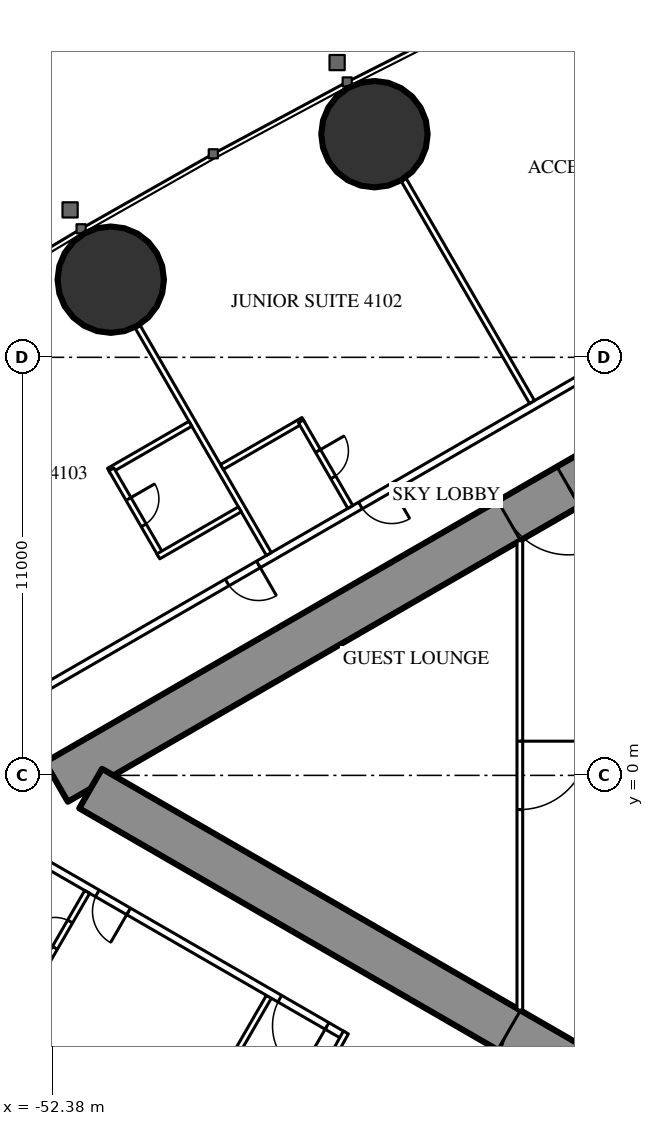
"""IFC4 building model, lengths in metres.
Left out: names, types, materials, properties, quantities, classifications, styles, units other than length and angle.
Written with IfcOpenShell. Run it as: python <this file> out.ifc"""

import sys

from ifc_helpers import new_model, si_unit, direction, frame, frame_2d, origin, origin_2d, place, context, subcontext, project, spatial, rectangle, circle, extrude, element, fill, save


model = new_model("IFC4")
c1 = context("Model", 3, precision=1e-05, world=origin(), true_north=direction((0.0, 1.0)))
c2 = subcontext(c1, "Body", "Model", "MODEL_VIEW")
j1 = project(units=[si_unit("LENGTHUNIT", "METRE"), si_unit("PLANEANGLEUNIT", "RADIAN")], contexts=[c1])
p1 = place(None, origin())
s1 = spatial("IfcSite", under=j1, at=p1, CompositionType="ELEMENT")
p2 = place(p1, origin())
s2 = spatial("IfcBuilding", under=s1, at=p2, CompositionType="ELEMENT")
p3 = place(p2, frame((0.0, 0.0, 156.3)))
s3 = spatial("IfcBuildingStorey", under=s2, at=p3, CompositionType="ELEMENT", Elevation=156.3)
for number, where, z_axis, x_axis in (
    (1, (-43.9, 16.871, 0.0), (0.0, 0.0, 1.0), (1.0, 0.0, 0.0)),
    (2, (-50.839, 13.043, 0.0), (0.0, 0.0, 1.0), (1.0, 0.0, 0.0)),
):
    element("IfcColumn", number, at=place(p3, frame(where, z_axis=z_axis, x_axis=x_axis)), inside=s3, PredefinedType="COLUMN", context=c2, shape_type="SweptSolid", body=[
        extrude(circle(Radius=1.4, at=origin_2d()), origin(), (0.0, 0.0, 1.0), 3.5),
    ])
p4 = place(p3, frame((-27.2, 14.3, 0.0), z_axis=(0.0, 0.0, 1.0), x_axis=(-0.866026593062, -0.499997940104, 0.0)))
e3 = element("IfcWall", 3, at=p4, inside=s3, PredefinedType="SHEAR", context=c2, shape_type="SweptSolid", body=[
    extrude(rectangle(XDim=28.946, YDim=1.2, at=frame_2d((14.473, 0.0))), origin(), (0.0, 0.0, 1.0), 3.5),
])
p5 = place(p4, frame((4.6, 0.0, 0.0)))
e4 = element("IfcOpeningElement", 4, at=p5, cuts=e3, PredefinedType="OPENING", context=c2, shape_type="SweptSolid", body=[
    extrude(rectangle(XDim=1.0, YDim=2.2, at=frame_2d((0.5, 1.1))), frame((0.0, 0.61, 0.0), z_axis=(0.0, -1.0, 0.0), x_axis=(1.0, 0.0, 0.0)), (0.0, 0.0, 1.0), 1.22),
])
p6 = place(p4, frame((13.395, 0.0, 0.0)))
e5 = element("IfcOpeningElement", 5, at=p6, cuts=e3, PredefinedType="OPENING", context=c2, shape_type="SweptSolid", body=[
    extrude(rectangle(XDim=1.8, YDim=2.2, at=frame_2d((0.9, 1.1))), frame((0.0, 0.61, 0.0), z_axis=(0.0, -1.0, 0.0), x_axis=(1.0, 0.0, 0.0)), (0.0, 0.0, 1.0), 1.22),
])
p7 = place(p3, frame((-27.2, -14.3, 0.0), z_axis=(0.0, 0.0, 1.0), x_axis=(-0.866024021859, 0.500002393557, 0.0)))
e6 = element("IfcWall", 6, at=p7, inside=s3, PredefinedType="SHEAR", context=c2, shape_type="SweptSolid", body=[
    extrude(rectangle(XDim=27.907, YDim=1.2, at=frame_2d((13.954, 0.0))), origin(), (0.0, 0.0, 1.0), 3.5),
])
p8 = place(p7, frame((4.6, 0.0, 0.0)))
e7 = element("IfcOpeningElement", 7, at=p8, cuts=e6, PredefinedType="OPENING", context=c2, shape_type="SweptSolid", body=[
    extrude(rectangle(XDim=1.0, YDim=2.2, at=frame_2d((0.5, 1.1))), frame((0.0, 0.61, 0.0), z_axis=(0.0, -1.0, 0.0), x_axis=(1.0, 0.0, 0.0)), (0.0, 0.0, 1.0), 1.22),
])
p9 = place(p7, frame((13.395, 0.0, 0.0)))
e8 = element("IfcOpeningElement", 8, at=p9, cuts=e6, PredefinedType="OPENING", context=c2, shape_type="SweptSolid", body=[
    extrude(rectangle(XDim=1.8, YDim=2.2, at=frame_2d((0.9, 1.1))), frame((0.0, 0.61, 0.0), z_axis=(0.0, -1.0, 0.0), x_axis=(1.0, 0.0, 0.0)), (0.0, 0.0, 1.0), 1.22),
])
p10 = place(p3, frame((-27.86, 16.575, 0.0), z_axis=(0.0, 0.0, 1.0), x_axis=(-0.866025533911, -0.499999774615, 0.0)))
e9 = element("IfcWall", 9, at=p10, inside=s3, PredefinedType="PARTITIONING", context=c2, shape_type="SweptSolid", body=[
    extrude(rectangle(XDim=33.149, YDim=0.2, at=frame_2d((16.575, 0.0))), origin(), (0.0, 0.0, 1.0), 3.25),
])
p11 = place(p10, frame((3.75, 0.0, 0.0)))
e10 = element("IfcOpeningElement", 10, at=p11, cuts=e9, PredefinedType="OPENING", context=c2, shape_type="SweptSolid", body=[
    extrude(rectangle(XDim=1.0, YDim=2.2, at=frame_2d((0.5, 1.1))), frame((0.0, 0.11, 0.0), z_axis=(0.0, -1.0, 0.0), x_axis=(1.0, 0.0, 0.0)), (0.0, 0.0, 1.0), 0.22),
])
p12 = place(p10, frame((17.997, 0.0, 0.0)))
e11 = element("IfcOpeningElement", 11, at=p12, cuts=e9, PredefinedType="OPENING", context=c2, shape_type="SweptSolid", body=[
    extrude(rectangle(XDim=0.95, YDim=2.2, at=frame_2d((0.475, 1.1))), frame((0.0, 0.11, 0.0), z_axis=(0.0, -1.0, 0.0), x_axis=(1.0, 0.0, 0.0)), (0.0, 0.0, 1.0), 0.22),
])
p13 = place(p10, frame((22.047, 0.0, 0.0)))
e12 = element("IfcOpeningElement", 12, at=p13, cuts=e9, PredefinedType="OPENING", context=c2, shape_type="SweptSolid", body=[
    extrude(rectangle(XDim=0.95, YDim=2.2, at=frame_2d((0.475, 1.1))), frame((0.0, 0.11, 0.0), z_axis=(0.0, -1.0, 0.0), x_axis=(1.0, 0.0, 0.0)), (0.0, 0.0, 1.0), 0.22),
])
p14 = place(p10, frame((30.042, 0.0, 0.0)))
e13 = element("IfcOpeningElement", 13, at=p14, cuts=e9, PredefinedType="OPENING", context=c2, shape_type="SweptSolid", body=[
    extrude(rectangle(XDim=0.95, YDim=2.2, at=frame_2d((0.475, 1.1))), frame((0.0, 0.11, 0.0), z_axis=(0.0, -1.0, 0.0), x_axis=(1.0, 0.0, 0.0)), (0.0, 0.0, 1.0), 0.22),
])
p15 = place(p3, frame((-39.754, 9.823, 0.0), z_axis=(0.0, 0.0, 1.0), x_axis=(-0.499997670926, 0.866026748472, 0.0)))
e14 = element("IfcWall", 14, at=p15, inside=s3, PredefinedType="PARTITIONING", context=c2, shape_type="SweptSolid", body=[
    extrude(rectangle(XDim=6.757, YDim=0.15, at=frame_2d((3.379, 0.0))), origin(), (0.0, 0.0, 1.0), 2.3),
])
for number, where, z_axis, x_axis in (
    (15, (-46.679, 5.825, 0.0), (0.0, 0.0, 1.0), (-0.5, 0.866, 0.0)),
    (16, (-46.679, -5.825, 0.0), (0.0, 0.0, 1.0), (-0.5, -0.866, 0.0)),
):
    element("IfcWall", number, at=place(p3, frame(where, z_axis=z_axis, x_axis=x_axis)), inside=s3, PredefinedType="PARTITIONING", context=c2, shape_type="SweptSolid", body=[
        extrude(rectangle(XDim=6.911, YDim=0.15, at=frame_2d((3.456, 0.0))), origin(), (0.0, 0.0, 1.0), 2.3),
    ])
p16 = place(p3, frame((-44.715, -6.844, 0.0), z_axis=(0.0, 0.0, 1.0), x_axis=(-0.866025261224, 0.500000246922, 0.0)))
e17 = element("IfcWall", 17, at=p16, inside=s3, PredefinedType="PARTITIONING", context=c2, shape_type="SweptSolid", body=[
    extrude(rectangle(XDim=13.567, YDim=0.2, at=frame_2d((6.783, 0.0))), origin(), (0.0, 0.0, 1.0), 3.25),
])
p17 = place(p16, frame((10.579, 0.0, 0.0)))
e18 = element("IfcOpeningElement", 18, at=p17, cuts=e17, PredefinedType="OPENING", context=c2, shape_type="SweptSolid", body=[
    extrude(rectangle(XDim=0.95, YDim=2.2, at=frame_2d((0.475, 1.1))), frame((0.0, 0.11, 0.0), z_axis=(0.0, -1.0, 0.0), x_axis=(1.0, 0.0, 0.0)), (0.0, 0.0, 1.0), 0.22),
])
p18 = place(p16, frame((6.529, 0.0, 0.0)))
e19 = element("IfcOpeningElement", 19, at=p18, cuts=e17, PredefinedType="OPENING", context=c2, shape_type="SweptSolid", body=[
    extrude(rectangle(XDim=0.95, YDim=2.2, at=frame_2d((0.475, 1.1))), frame((0.0, 0.11, 0.0), z_axis=(0.0, -1.0, 0.0), x_axis=(1.0, 0.0, 0.0)), (0.0, 0.0, 1.0), 0.22),
])
p19 = place(p16, frame((0.5, 0.0, 0.0)))
e20 = element("IfcOpeningElement", 20, at=p19, cuts=e17, PredefinedType="OPENING", context=c2, shape_type="SweptSolid", body=[
    extrude(rectangle(XDim=1.435, YDim=2.2, at=frame_2d((0.718, 1.1))), frame((0.0, 0.11, 0.0), z_axis=(0.0, -1.0, 0.0), x_axis=(1.0, 0.0, 0.0)), (0.0, 0.0, 1.0), 0.22),
])
p20 = place(p3, frame((-44.652, -6.764, 0.0), z_axis=(0.0, 0.0, 1.0), x_axis=(-0.485424724123, -0.874278466629, 0.0)))
e21 = element("IfcWall", 21, at=p20, inside=s3, PredefinedType="PARTITIONING", context=c2, shape_type="SweptSolid", body=[
    extrude(rectangle(XDim=1.805, YDim=0.15, at=frame_2d((0.903, 0.0))), origin(), (0.0, 0.0, 1.0), 3.25),
])
p21 = place(p3, frame((-45.771, 9.352, 0.0), z_axis=(0.0, 0.0, 1.0), x_axis=(-0.866006523861, -0.500032699561, 0.0)))
e22 = element("IfcWall", 22, at=p21, inside=s3, PredefinedType="PARTITIONING", context=c2, shape_type="SweptSolid", body=[
    extrude(rectangle(XDim=2.475, YDim=0.15, at=frame_2d((1.237, 0.0))), origin(), (0.0, 0.0, 1.0), 3.25),
])
p22 = place(p3, frame((-44.535, 7.063, 0.0), z_axis=(0.0, 0.0, 1.0), x_axis=(-0.500047596559, 0.865997922154, 0.0)))
e23 = element("IfcWall", 23, at=p22, inside=s3, PredefinedType="PARTITIONING", context=c2, shape_type="SweptSolid", body=[
    extrude(rectangle(XDim=2.6, YDim=0.15, at=frame_2d((1.3, 0.0))), origin(), (0.0, 0.0, 1.0), 3.25),
])
p23 = place(p22, frame((0.9, 0.0, 0.0)))
e24 = element("IfcOpeningElement", 24, at=p23, cuts=e23, PredefinedType="OPENING", context=c2, shape_type="SweptSolid", body=[
    extrude(rectangle(XDim=0.8, YDim=2.2, at=frame_2d((0.4, 1.1))), frame((0.0, 0.085, 0.0), z_axis=(0.0, -1.0, 0.0), x_axis=(1.0, 0.0, 0.0)), (0.0, 0.0, 1.0), 0.17),
])
p24 = place(p3, frame((-48.744, 9.252, 0.0), z_axis=(0.0, 0.0, 1.0), x_axis=(-0.866006523861, -0.500032699561, 0.0)))
e25 = element("IfcWall", 25, at=p24, inside=s3, PredefinedType="PARTITIONING", context=c2, shape_type="SweptSolid", body=[
    extrude(rectangle(XDim=2.475, YDim=0.15, at=frame_2d((1.237, 0.0))), origin(), (0.0, 0.0, 1.0), 3.25),
])
p25 = place(p3, frame((-49.522, 5.8, 0.0), z_axis=(0.0, 0.0, 1.0), x_axis=(-0.500006934395, 0.866021400173, 0.0)))
e26 = element("IfcWall", 26, at=p25, inside=s3, PredefinedType="PARTITIONING", context=c2, shape_type="SweptSolid", body=[
    extrude(rectangle(XDim=2.6, YDim=0.15, at=frame_2d((1.3, 0.0))), origin(), (0.0, 0.0, 1.0), 3.25),
])
p26 = place(p25, frame((0.9, 0.0, 0.0)))
e27 = element("IfcOpeningElement", 27, at=p26, cuts=e26, PredefinedType="OPENING", context=c2, shape_type="SweptSolid", body=[
    extrude(rectangle(XDim=0.8, YDim=2.2, at=frame_2d((0.4, 1.1))), frame((0.0, 0.085, 0.0), z_axis=(0.0, -1.0, 0.0), x_axis=(1.0, 0.0, 0.0)), (0.0, 0.0, 1.0), 0.17),
])
p27 = place(p3, frame((-47.444, 7.0, 0.0), z_axis=(0.0, 0.0, 1.0), x_axis=(-0.866006523861, -0.500032699561, 0.0)))
e28 = element("IfcWall", 28, at=p27, inside=s3, PredefinedType="PARTITIONING", context=c2, shape_type="SweptSolid", body=[
    extrude(rectangle(XDim=2.475, YDim=0.15, at=frame_2d((1.237, 0.0))), origin(), (0.0, 0.0, 1.0), 3.25),
])
p28 = place(p3, frame((-51.459, -3.065, 0.0), z_axis=(0.0, 0.0, 1.0), x_axis=(-0.499936506574, -0.866062058628, 0.0)))
e29 = element("IfcWall", 29, at=p28, inside=s3, PredefinedType="PARTITIONING", context=c2, shape_type="SweptSolid", body=[
    extrude(rectangle(XDim=2.6, YDim=0.15, at=frame_2d((1.3, 0.0))), origin(), (0.0, 0.0, 1.0), 3.25),
])
p29 = place(p28, frame((0.9, 0.0, 0.0)))
e30 = element("IfcOpeningElement", 30, at=p29, cuts=e29, PredefinedType="OPENING", context=c2, shape_type="SweptSolid", body=[
    extrude(rectangle(XDim=0.8, YDim=2.2, at=frame_2d((0.4, 1.1))), frame((0.0, 0.085, 0.0), z_axis=(0.0, -1.0, 0.0), x_axis=(1.0, 0.0, 0.0)), (0.0, 0.0, 1.0), 0.17),
])
p30 = place(p3, frame((-40.075, 6.174, 0.0), z_axis=(0.0, 0.0, 1.0), x_axis=(0.0, -1.0, 0.0)))
e31 = element("IfcWall", 31, at=p30, inside=s3, PredefinedType="PARTITIONING", context=c2, shape_type="SweptSolid", body=[
    extrude(rectangle(XDim=12.348, YDim=0.15, at=frame_2d((6.174, 0.0))), origin(), (0.0, 0.0, 1.0), 3.25),
])
p31 = place(p30, frame((5.274, 0.0, 0.0)))
e32 = element("IfcOpeningElement", 32, at=p31, cuts=e31, PredefinedType="OPENING", context=c2, shape_type="SweptSolid", body=[
    extrude(rectangle(XDim=1.8, YDim=2.2, at=frame_2d((0.9, 1.1))), frame((0.0, 0.085, 0.0), z_axis=(0.0, -1.0, 0.0), x_axis=(1.0, 0.0, 0.0)), (0.0, 0.0, 1.0), 0.17),
])
p32 = place(p23, origin())
e33 = element("IfcDoor", 33, at=p32, inside=s3, OperationType="SINGLE_SWING_RIGHT", PredefinedType="DOOR", context=c2, shape_type="SweptSolid", body=[
    extrude(rectangle(XDim=0.8, YDim=2.2, at=frame_2d((0.4, 1.1))), frame((0.0, 0.025, 0.0), z_axis=(0.0, -1.0, 0.0), x_axis=(1.0, 0.0, 0.0)), (0.0, 0.0, 1.0), 0.05),
])
fill(e24, e33)
p33 = place(p12, origin())
e34 = element("IfcDoor", 34, at=p33, inside=s3, OperationType="SINGLE_SWING_LEFT", PredefinedType="DOOR", context=c2, shape_type="SweptSolid", body=[
    extrude(rectangle(XDim=0.95, YDim=2.2, at=frame_2d((0.475, 1.1))), frame((0.0, 0.025, 0.0), z_axis=(0.0, -1.0, 0.0), x_axis=(1.0, 0.0, 0.0)), (0.0, 0.0, 1.0), 0.05),
])
fill(e11, e34)
p34 = place(p26, origin())
e35 = element("IfcDoor", 35, at=p34, inside=s3, OperationType="SINGLE_SWING_RIGHT", PredefinedType="DOOR", context=c2, shape_type="SweptSolid", body=[
    extrude(rectangle(XDim=0.8, YDim=2.2, at=frame_2d((0.4, 1.1))), frame((0.0, 0.025, 0.0), z_axis=(0.0, -1.0, 0.0), x_axis=(1.0, 0.0, 0.0)), (0.0, 0.0, 1.0), 0.05),
])
fill(e27, e35)
p35 = place(p13, origin())
e36 = element("IfcDoor", 36, at=p35, inside=s3, OperationType="SINGLE_SWING_LEFT", PredefinedType="DOOR", context=c2, shape_type="SweptSolid", body=[
    extrude(rectangle(XDim=0.95, YDim=2.2, at=frame_2d((0.475, 1.1))), frame((0.0, 0.025, 0.0), z_axis=(0.0, -1.0, 0.0), x_axis=(1.0, 0.0, 0.0)), (0.0, 0.0, 1.0), 0.05),
])
fill(e12, e36)
p36 = place(p29, origin())
e37 = element("IfcDoor", 37, at=p36, inside=s3, OperationType="SINGLE_SWING_RIGHT", PredefinedType="DOOR", context=c2, shape_type="SweptSolid", body=[
    extrude(rectangle(XDim=0.8, YDim=2.2, at=frame_2d((0.4, 1.1))), frame((0.0, 0.025, 0.0), z_axis=(0.0, -1.0, 0.0), x_axis=(1.0, 0.0, 0.0)), (0.0, 0.0, 1.0), 0.05),
])
fill(e30, e37)
p37 = place(p18, origin())
e38 = element("IfcDoor", 38, at=p37, inside=s3, OperationType="SINGLE_SWING_LEFT", PredefinedType="DOOR", context=c2, shape_type="SweptSolid", body=[
    extrude(rectangle(XDim=0.95, YDim=2.2, at=frame_2d((0.475, 1.1))), frame((0.0, 0.025, 0.0), z_axis=(0.0, -1.0, 0.0), x_axis=(1.0, 0.0, 0.0)), (0.0, 0.0, 1.0), 0.05),
])
fill(e19, e38)
p38 = place(p19, origin())
e39 = element("IfcDoor", 39, at=p38, inside=s3, OperationType="SINGLE_SWING_LEFT", PredefinedType="DOOR", context=c2, shape_type="SweptSolid", body=[
    extrude(rectangle(XDim=1.435, YDim=2.2, at=frame_2d((0.718, 1.1))), frame((0.0, 0.025, 0.0), z_axis=(0.0, -1.0, 0.0), x_axis=(1.0, 0.0, 0.0)), (0.0, 0.0, 1.0), 0.05),
])
fill(e20, e39)
p39 = place(p31, origin())
e40 = element("IfcDoor", 40, at=p39, inside=s3, OperationType="DOUBLE_DOOR_SINGLE_SWING", PredefinedType="DOOR", context=c2, shape_type="SweptSolid", body=[
    extrude(rectangle(XDim=1.8, YDim=2.2, at=frame_2d((0.9, 1.1))), frame((0.0, 0.025, 0.0), z_axis=(0.0, -1.0, 0.0), x_axis=(1.0, 0.0, 0.0)), (0.0, 0.0, 1.0), 0.05),
])
fill(e32, e40)
p40 = place(p6, origin())
e41 = element("IfcDoor", 41, at=p40, inside=s3, OperationType="DOUBLE_DOOR_SINGLE_SWING", PredefinedType="DOOR", context=c2, shape_type="SweptSolid", body=[
    extrude(rectangle(XDim=1.8, YDim=2.2, at=frame_2d((0.9, 1.1))), frame((0.0, 0.025, 0.0), z_axis=(0.0, -1.0, 0.0), x_axis=(1.0, 0.0, 0.0)), (0.0, 0.0, 1.0), 0.05),
])
fill(e5, e41)
p41 = place(p9, origin())
e42 = element("IfcDoor", 42, at=p41, inside=s3, OperationType="DOUBLE_DOOR_SINGLE_SWING", PredefinedType="DOOR", context=c2, shape_type="SweptSolid", body=[
    extrude(rectangle(XDim=1.8, YDim=2.2, at=frame_2d((0.9, 1.1))), frame((0.0, 0.025, 0.0), z_axis=(0.0, -1.0, 0.0), x_axis=(1.0, 0.0, 0.0)), (0.0, 0.0, 1.0), 0.05),
])
fill(e8, e42)
save(model, sys.argv[1])
